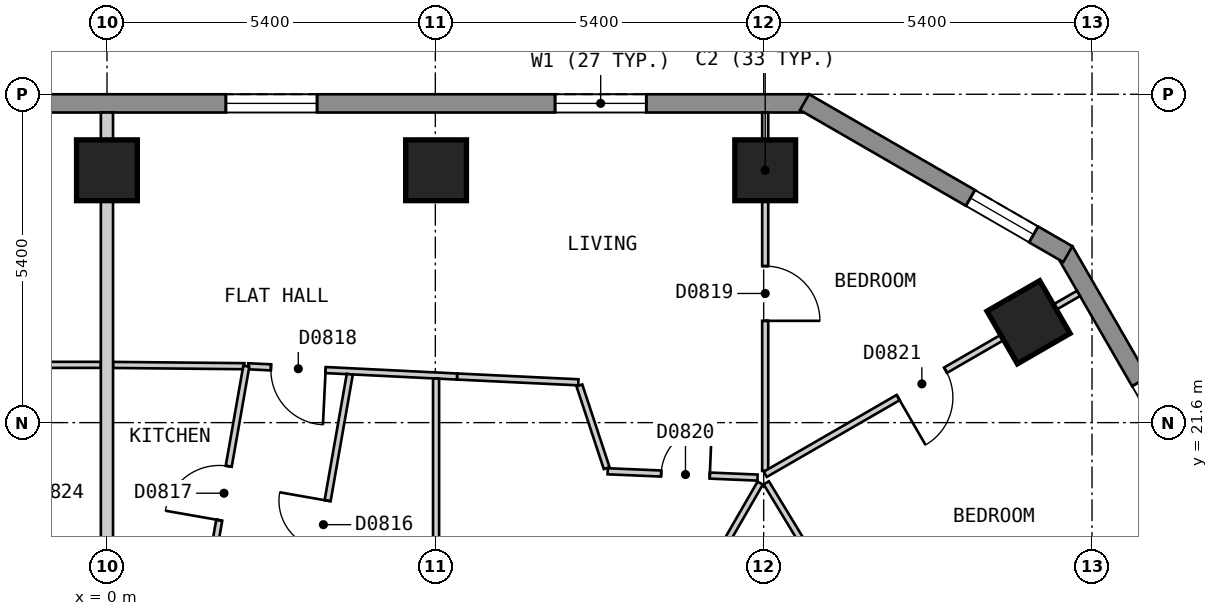
"""IFC4 building model, lengths in metres.
Left out: names, types, materials, properties, quantities, classifications, styles, units other than length and angle.
Written with IfcOpenShell. Run it as: python <this file> out.ifc"""

import sys

from ifc_helpers import new_model, si_unit, direction, frame, frame_2d, origin, origin_2d, place, context, subcontext, project, spatial, polyline, rectangle, outline, extrude, element, fill, save


model = new_model("IFC4")
c1 = context("Model", 3, precision=1e-05, world=origin(), true_north=direction((0.0, 1.0)))
c2 = subcontext(c1, "Body", "Model", "MODEL_VIEW")
j1 = project(units=[si_unit("LENGTHUNIT", "METRE"), si_unit("PLANEANGLEUNIT", "RADIAN")], contexts=[c1])
p1 = place(None, origin())
s1 = spatial("IfcSite", under=j1, at=p1, CompositionType="ELEMENT")
p2 = place(p1, origin())
s2 = spatial("IfcBuilding", under=s1, at=p2, CompositionType="ELEMENT")
p3 = place(p2, frame((0.0, 0.0, 84.0)))
s3 = spatial("IfcBuildingStorey", under=s2, at=p3, CompositionType="ELEMENT", Elevation=84.0)
for number, where, z_axis, x_axis in (
    (1, (10.825, 25.75, 0.0), (0.0, 0.0, 1.0), (-1.0, 0.0, 0.0)),
    (2, (5.412, 25.75, 0.0), (0.0, 0.0, 1.0), (-1.0, 0.0, 0.0)),
    (3, (-0.001, 25.75, 0.0), (0.0, 0.0, 1.0), (-1.0, 0.0, 0.0)),
    (4, (15.156, 23.25, 0.0), (0.0, 0.0, 1.0), (-0.5, 0.866, 0.0)),
):
    element("IfcColumn", number, at=place(p3, frame(where, z_axis=z_axis, x_axis=x_axis)), inside=s3, PredefinedType="COLUMN", context=c2, shape_type="SweptSolid", body=[
        extrude(rectangle(XDim=1.0, YDim=1.0, at=origin_2d()), origin(), (0.0, 0.0, 1.0), 3.0),
    ])
p4 = place(p3, frame((11.547, 26.85, 0.0), z_axis=(0.0, 0.0, 1.0), x_axis=(-1.0, 0.0, 0.0)))
e5 = element("IfcWall", 5, at=p4, inside=s3, PredefinedType="SOLIDWALL", context=c2, shape_type="SweptSolid", body=[
    extrude(outline(polyline([(0.0, -0.15), (23.094, -0.15), (23.014, 0.15), (0.08, 0.15), (0.0, -0.15)])), origin(), (0.0, 0.0, 1.0), 2.7),
])
p5 = place(p4, frame((2.678, 0.0, 0.15)))
e6 = element("IfcOpeningElement", 6, at=p5, cuts=e5, PredefinedType="OPENING", context=c2, shape_type="SweptSolid", body=[
    extrude(rectangle(XDim=1.5, YDim=2.1, at=frame_2d((0.75, 1.05))), frame((0.0, 0.16, 0.0), z_axis=(0.0, -1.0, 0.0), x_axis=(1.0, 0.0, 0.0)), (0.0, 0.0, 1.0), 0.32),
])
p6 = place(p4, frame((8.092, 0.0, 0.15)))
e7 = element("IfcOpeningElement", 7, at=p6, cuts=e5, PredefinedType="OPENING", context=c2, shape_type="SweptSolid", body=[
    extrude(rectangle(XDim=1.5, YDim=2.1, at=frame_2d((0.75, 1.05))), frame((0.0, 0.16, 0.0), z_axis=(0.0, -1.0, 0.0), x_axis=(1.0, 0.0, 0.0)), (0.0, 0.0, 1.0), 0.32),
])
p7 = place(p4, frame((13.504, 0.0, 0.15)))
e8 = element("IfcOpeningElement", 8, at=p7, cuts=e5, PredefinedType="OPENING", context=c2, shape_type="SweptSolid", body=[
    extrude(rectangle(XDim=1.5, YDim=2.1, at=frame_2d((0.75, 1.05))), frame((0.0, 0.16, 0.0), z_axis=(0.0, -1.0, 0.0), x_axis=(1.0, 0.0, 0.0)), (0.0, 0.0, 1.0), 0.32),
])
p8 = place(p4, frame((18.917, 0.0, 0.15)))
e9 = element("IfcOpeningElement", 9, at=p8, cuts=e5, PredefinedType="OPENING", context=c2, shape_type="SweptSolid", body=[
    extrude(rectangle(XDim=1.5, YDim=2.1, at=frame_2d((0.75, 1.05))), frame((0.0, 0.16, 0.0), z_axis=(0.0, -1.0, 0.0), x_axis=(1.0, 0.0, 0.0)), (0.0, 0.0, 1.0), 0.32),
])
p9 = place(p3, frame((29.027, 1.425, 0.0), z_axis=(0.0, 0.0, 1.0), x_axis=(-0.500027479704, 0.866009537788, 0.0)))
e10 = element("IfcWall", 10, at=p9, inside=s3, PredefinedType="SOLIDWALL", context=c2, shape_type="SweptSolid", body=[
    extrude(outline(polyline([(0.0, -0.15), (26.559, -0.15), (26.478, 0.15), (0.08, 0.15), (0.0, -0.15)])), origin(), (0.0, 0.0, 1.0), 2.7),
])
p10 = place(p9, frame((2.483, 0.0, 0.15)))
e11 = element("IfcOpeningElement", 11, at=p10, cuts=e10, PredefinedType="OPENING", context=c2, shape_type="SweptSolid", body=[
    extrude(rectangle(XDim=1.5, YDim=2.1, at=frame_2d((0.75, 1.05))), frame((0.0, 0.16, 0.0), z_axis=(0.0, -1.0, 0.0), x_axis=(1.0, 0.0, 0.0)), (0.0, 0.0, 1.0), 0.32),
])
p11 = place(p9, frame((7.506, 0.0, 0.15)))
e12 = element("IfcOpeningElement", 12, at=p11, cuts=e10, PredefinedType="OPENING", context=c2, shape_type="SweptSolid", body=[
    extrude(rectangle(XDim=1.5, YDim=2.1, at=frame_2d((0.75, 1.05))), frame((0.0, 0.16, 0.0), z_axis=(0.0, -1.0, 0.0), x_axis=(1.0, 0.0, 0.0)), (0.0, 0.0, 1.0), 0.32),
])
p12 = place(p9, frame((12.529, 0.0, 0.15)))
e13 = element("IfcOpeningElement", 13, at=p12, cuts=e10, PredefinedType="OPENING", context=c2, shape_type="SweptSolid", body=[
    extrude(rectangle(XDim=1.5, YDim=2.1, at=frame_2d((0.75, 1.05))), frame((0.0, 0.16, 0.0), z_axis=(0.0, -1.0, 0.0), x_axis=(1.0, 0.0, 0.0)), (0.0, 0.0, 1.0), 0.32),
])
p13 = place(p9, frame((17.552, 0.0, 0.15)))
e14 = element("IfcOpeningElement", 14, at=p13, cuts=e10, PredefinedType="OPENING", context=c2, shape_type="SweptSolid", body=[
    extrude(rectangle(XDim=1.5, YDim=2.1, at=frame_2d((0.75, 1.05))), frame((0.0, 0.16, 0.0), z_axis=(0.0, -1.0, 0.0), x_axis=(1.0, 0.0, 0.0)), (0.0, 0.0, 1.0), 0.32),
])
p14 = place(p9, frame((22.575, 0.0, 0.15)))
e15 = element("IfcOpeningElement", 15, at=p14, cuts=e10, PredefinedType="OPENING", context=c2, shape_type="SweptSolid", body=[
    extrude(rectangle(XDim=1.5, YDim=2.1, at=frame_2d((0.75, 1.05))), frame((0.0, 0.16, 0.0), z_axis=(0.0, -1.0, 0.0), x_axis=(1.0, 0.0, 0.0)), (0.0, 0.0, 1.0), 0.32),
])
p15 = place(p3, frame((15.802, 24.37, 0.0), z_axis=(0.0, 0.0, 1.0), x_axis=(-0.866022959057, 0.500004234368, 0.0)))
e16 = element("IfcWall", 16, at=p15, inside=s3, PredefinedType="SOLIDWALL", context=c2, shape_type="SweptSolid", body=[
    extrude(outline(polyline([(0.0, -0.15), (5.0, -0.15), (4.92, 0.15), (0.08, 0.15), (0.0, -0.15)])), origin(), (0.0, 0.0, 1.0), 2.7),
])
p16 = place(p15, frame((0.65, 0.0, 0.15)))
e17 = element("IfcOpeningElement", 17, at=p16, cuts=e16, PredefinedType="OPENING", context=c2, shape_type="SweptSolid", body=[
    extrude(rectangle(XDim=1.2, YDim=2.1, at=frame_2d((0.6, 1.05))), frame((0.0, 0.16, 0.0), z_axis=(0.0, -1.0, 0.0), x_axis=(1.0, 0.0, 0.0)), (0.0, 0.0, 1.0), 0.32),
])
p17 = place(p3, frame((0.099, 22.549, 0.0), z_axis=(0.0, 0.0, 1.0), x_axis=(0.99995279897, -0.009715957599, 0.0)))
e18 = element("IfcWall", 18, at=p17, inside=s3, PredefinedType="PARTITIONING", context=c2, shape_type="SweptSolid", body=[
    extrude(rectangle(XDim=2.161, YDim=0.1, at=frame_2d((1.081, 0.0))), origin(), (0.0, 0.0, 1.0), 2.7),
])
p18 = place(p3, frame((7.769, 22.212, 0.0), z_axis=(0.0, 0.0, 1.0), x_axis=(0.313312924695, -0.949649941409, 0.0)))
e19 = element("IfcWall", 19, at=p18, inside=s3, PredefinedType="PARTITIONING", context=c2, shape_type="SweptSolid", body=[
    extrude(rectangle(XDim=1.433, YDim=0.1, at=frame_2d((0.717, 0.0))), origin(), (0.0, 0.0, 1.0), 2.7),
])
p19 = place(p3, frame((10.843, 20.61, 0.0), z_axis=(0.0, 0.0, 1.0), x_axis=(0.518481125811, -0.855089072657, 0.0)))
e20 = element("IfcWall", 20, at=p19, inside=s3, PredefinedType="PARTITIONING", context=c2, shape_type="SweptSolid", body=[
    extrude(rectangle(XDim=4.795, YDim=0.1, at=frame_2d((2.397, 0.0))), origin(), (0.0, 0.0, 1.0), 2.7),
])
p20 = place(p19, frame((1.999, 0.0, 0.0)))
e21 = element("IfcOpeningElement", 21, at=p20, cuts=e20, PredefinedType="OPENING", context=c2, shape_type="SweptSolid", body=[
    extrude(rectangle(XDim=0.8, YDim=2.1, at=frame_2d((0.4, 1.05))), frame((0.0, 0.06, 0.0), z_axis=(0.0, -1.0, 0.0), x_axis=(1.0, 0.0, 0.0)), (0.0, 0.0, 1.0), 0.12),
])
p21 = place(p3, frame((8.235, 20.8, 0.0), z_axis=(0.0, 0.0, 1.0), x_axis=(0.999110277005, -0.042174096116, 0.0)))
e22 = element("IfcWall", 22, at=p21, inside=s3, PredefinedType="PARTITIONING", context=c2, shape_type="SweptSolid", body=[
    extrude(rectangle(XDim=2.466, YDim=0.1, at=frame_2d((1.233, 0.0))), origin(), (0.0, 0.0, 1.0), 2.7),
])
p22 = place(p21, frame((0.88, 0.0, 0.0)))
e23 = element("IfcOpeningElement", 23, at=p22, cuts=e22, PredefinedType="OPENING", context=c2, shape_type="SweptSolid", body=[
    extrude(rectangle(XDim=0.8, YDim=2.1, at=frame_2d((0.4, 1.05))), frame((0.0, 0.06, 0.0), z_axis=(0.0, -1.0, 0.0), x_axis=(1.0, 0.0, 0.0)), (0.0, 0.0, 1.0), 0.12),
])
p23 = place(p3, frame((5.757, 22.358, 0.0), z_axis=(0.0, 0.0, 1.0), x_axis=(0.998868690804, -0.047553533316, 0.0)))
e24 = element("IfcWall", 24, at=p23, inside=s3, PredefinedType="PARTITIONING", context=c2, shape_type="SweptSolid", body=[
    extrude(rectangle(XDim=1.997, YDim=0.1, at=frame_2d((0.999, 0.0))), origin(), (0.0, 0.0, 1.0), 2.7),
])
p24 = place(p3, frame((2.321, 22.527, 0.0), z_axis=(0.0, 0.0, 1.0), x_axis=(0.998789924329, -0.049180149038, 0.0)))
e25 = element("IfcWall", 25, at=p24, inside=s3, PredefinedType="PARTITIONING", context=c2, shape_type="SweptSolid", body=[
    extrude(rectangle(XDim=3.44, YDim=0.1, at=frame_2d((1.72, 0.0))), origin(), (0.0, 0.0, 1.0), 2.7),
])
p25 = place(p24, frame((0.376, 0.0, 0.0)))
e26 = element("IfcOpeningElement", 26, at=p25, cuts=e25, PredefinedType="OPENING", context=c2, shape_type="SweptSolid", body=[
    extrude(rectangle(XDim=0.9, YDim=2.1, at=frame_2d((0.45, 1.05))), frame((0.0, 0.06, 0.0), z_axis=(0.0, -1.0, 0.0), x_axis=(1.0, 0.0, 0.0)), (0.0, 0.0, 1.0), 0.12),
])
p26 = place(p3, frame((-5.384, 22.55, 0.0), z_axis=(0.0, 0.0, 1.0), x_axis=(1.0, 0.0, 0.0)))
e27 = element("IfcWall", 27, at=p26, inside=s3, PredefinedType="PARTITIONING", context=c2, shape_type="SweptSolid", body=[
    extrude(rectangle(XDim=5.283, YDim=0.1, at=frame_2d((2.642, 0.0))), origin(), (0.0, 0.0, 1.0), 2.7),
])
p27 = place(p26, frame((2.226, 0.0, 0.0)))
e28 = element("IfcOpeningElement", 28, at=p27, cuts=e27, PredefinedType="OPENING", context=c2, shape_type="SweptSolid", body=[
    extrude(rectangle(XDim=0.9, YDim=2.1, at=frame_2d((0.45, 1.05))), frame((0.0, 0.06, 0.0), z_axis=(0.0, -1.0, 0.0), x_axis=(1.0, 0.0, 0.0)), (0.0, 0.0, 1.0), 0.12),
])
p28 = place(p3, frame((8.43, 16.6, 0.0), z_axis=(0.0, 0.0, 1.0), x_axis=(0.50003312339, 0.866006279142, 0.0)))
e29 = element("IfcWall", 29, at=p28, inside=s3, PredefinedType="PARTITIONING", context=c2, shape_type="SweptSolid", body=[
    extrude(rectangle(XDim=4.626, YDim=0.1, at=frame_2d((2.313, 0.0))), origin(), (0.0, 0.0, 1.0), 2.7),
])
p29 = place(p3, frame((3.134, 17.5, 0.0), z_axis=(0.0, 0.0, 1.0), x_axis=(0.172821216702, 0.984953210593, 0.0)))
e30 = element("IfcWall", 30, at=p29, inside=s3, PredefinedType="PARTITIONING", context=c2, shape_type="SweptSolid", body=[
    extrude(rectangle(XDim=4.97, YDim=0.1, at=frame_2d((2.485, 0.0))), origin(), (0.0, 0.0, 1.0), 2.7),
])
p30 = place(p29, frame((2.059, 0.0, 0.0)))
e31 = element("IfcOpeningElement", 31, at=p30, cuts=e30, PredefinedType="OPENING", context=c2, shape_type="SweptSolid", body=[
    extrude(rectangle(XDim=0.8, YDim=2.1, at=frame_2d((0.4, 1.05))), frame((0.0, 0.06, 0.0), z_axis=(0.0, -1.0, 0.0), x_axis=(1.0, 0.0, 0.0)), (0.0, 0.0, 1.0), 0.12),
])
p31 = place(p3, frame((1.557, 18.35, 0.0), z_axis=(0.0, 0.0, 1.0), x_axis=(0.173062973099, 0.984910761106, 0.0)))
e32 = element("IfcWall", 32, at=p31, inside=s3, PredefinedType="PARTITIONING", context=c2, shape_type="SweptSolid", body=[
    extrude(rectangle(XDim=4.242, YDim=0.1, at=frame_2d((2.121, 0.0))), origin(), (0.0, 0.0, 1.0), 2.7),
])
p32 = place(p31, frame((1.671, 0.0, 0.0)))
e33 = element("IfcOpeningElement", 33, at=p32, cuts=e32, PredefinedType="OPENING", context=c2, shape_type="SweptSolid", body=[
    extrude(rectangle(XDim=0.9, YDim=2.1, at=frame_2d((0.45, 1.05))), frame((0.0, 0.06, 0.0), z_axis=(0.0, -1.0, 0.0), x_axis=(1.0, 0.0, 0.0)), (0.0, 0.0, 1.0), 0.12),
])
p33 = place(p3, frame((5.412, 17.4, 0.0), z_axis=(0.0, 0.0, 1.0), x_axis=(0.0, 1.0, 0.0)))
e34 = element("IfcWall", 34, at=p33, inside=s3, PredefinedType="PARTITIONING", context=c2, shape_type="SweptSolid", body=[
    extrude(rectangle(XDim=4.925, YDim=0.1, at=frame_2d((2.462, 0.0))), origin(), (0.0, 0.0, 1.0), 2.7),
])
p34 = place(p3, frame((10.825, 20.806, 0.0), z_axis=(0.0, 0.0, 1.0), x_axis=(0.0, 1.0, 0.0)))
e35 = element("IfcWall", 35, at=p34, inside=s3, PredefinedType="PARTITIONING", context=c2, shape_type="SweptSolid", body=[
    extrude(rectangle(XDim=5.894, YDim=0.1, at=frame_2d((2.947, 0.0))), origin(), (0.0, 0.0, 1.0), 2.7),
])
p35 = place(p34, frame((2.468, 0.0, 0.0)))
e36 = element("IfcOpeningElement", 36, at=p35, cuts=e35, PredefinedType="OPENING", context=c2, shape_type="SweptSolid", body=[
    extrude(rectangle(XDim=0.9, YDim=2.1, at=frame_2d((0.45, 1.05))), frame((0.0, 0.06, 0.0), z_axis=(0.0, -1.0, 0.0), x_axis=(1.0, 0.0, 0.0)), (0.0, 0.0, 1.0), 0.12),
])
p36 = place(p3, frame((10.826, 20.75, 0.0), z_axis=(0.0, 0.0, 1.0), x_axis=(0.865986712877, 0.50006700863, 0.0)))
e37 = element("IfcWall", 37, at=p36, inside=s3, PredefinedType="PARTITIONING", context=c2, shape_type="SweptSolid", body=[
    extrude(rectangle(XDim=5.949, YDim=0.1, at=frame_2d((2.975, 0.0))), origin(), (0.0, 0.0, 1.0), 2.7),
])
p37 = place(p36, frame((2.524, 0.0, 0.0)))
e38 = element("IfcOpeningElement", 38, at=p37, cuts=e37, PredefinedType="OPENING", context=c2, shape_type="SweptSolid", body=[
    extrude(rectangle(XDim=0.9, YDim=2.1, at=frame_2d((0.45, 1.05))), frame((0.0, 0.06, 0.0), z_axis=(0.0, -1.0, 0.0), x_axis=(1.0, 0.0, 0.0)), (0.0, 0.0, 1.0), 0.12),
])
p38 = place(p3, frame((-0.001, 18.45, 0.0), z_axis=(0.0, 0.0, 1.0), x_axis=(0.0, 1.0, 0.0)))
e39 = element("IfcWall", 39, at=p38, inside=s3, PredefinedType="PARTITIONING", context=c2, shape_type="SweptSolid", body=[
    extrude(rectangle(XDim=8.25, YDim=0.2, at=frame_2d((4.125, 0.0))), origin(), (0.0, 0.0, 1.0), 2.7),
])
p39 = place(p5, origin())
e40 = element("IfcWindow", 40, at=p39, inside=s3, PartitioningType="SINGLE_PANEL", PredefinedType="WINDOW", context=c2, shape_type="SweptSolid", body=[
    extrude(rectangle(XDim=1.5, YDim=2.1, at=frame_2d((0.75, 1.05))), frame((0.0, 0.03, 0.0), z_axis=(0.0, -1.0, 0.0), x_axis=(1.0, 0.0, 0.0)), (0.0, 0.0, 1.0), 0.06),
])
fill(e6, e40)
p40 = place(p6, origin())
e41 = element("IfcWindow", 41, at=p40, inside=s3, PartitioningType="SINGLE_PANEL", PredefinedType="WINDOW", context=c2, shape_type="SweptSolid", body=[
    extrude(rectangle(XDim=1.5, YDim=2.1, at=frame_2d((0.75, 1.05))), frame((0.0, 0.03, 0.0), z_axis=(0.0, -1.0, 0.0), x_axis=(1.0, 0.0, 0.0)), (0.0, 0.0, 1.0), 0.06),
])
fill(e7, e41)
p41 = place(p16, origin())
e42 = element("IfcWindow", 42, at=p41, inside=s3, PartitioningType="SINGLE_PANEL", PredefinedType="WINDOW", context=c2, shape_type="SweptSolid", body=[
    extrude(rectangle(XDim=1.2, YDim=2.1, at=frame_2d((0.6, 1.05))), frame((0.0, 0.03, 0.0), z_axis=(0.0, -1.0, 0.0), x_axis=(1.0, 0.0, 0.0)), (0.0, 0.0, 1.0), 0.06),
])
fill(e17, e42)
p42 = place(p30, origin())
e43 = element("IfcDoor", 43, at=p42, inside=s3, OperationType="SINGLE_SWING_RIGHT", PredefinedType="DOOR", context=c2, shape_type="SweptSolid", body=[
    extrude(rectangle(XDim=0.8, YDim=2.1, at=frame_2d((0.4, 1.05))), frame((0.0, 0.025, 0.0), z_axis=(0.0, -1.0, 0.0), x_axis=(1.0, 0.0, 0.0)), (0.0, 0.0, 1.0), 0.05),
])
fill(e31, e43)
p43 = place(p32, origin())
e44 = element("IfcDoor", 44, at=p43, inside=s3, OperationType="SINGLE_SWING_LEFT", PredefinedType="DOOR", context=c2, shape_type="SweptSolid", body=[
    extrude(rectangle(XDim=0.9, YDim=2.1, at=frame_2d((0.45, 1.05))), frame((0.0, 0.025, 0.0), z_axis=(0.0, -1.0, 0.0), x_axis=(1.0, 0.0, 0.0)), (0.0, 0.0, 1.0), 0.05),
])
fill(e33, e44)
p44 = place(p25, origin())
e45 = element("IfcDoor", 45, at=p44, inside=s3, OperationType="SINGLE_SWING_RIGHT", PredefinedType="DOOR", context=c2, shape_type="SweptSolid", body=[
    extrude(rectangle(XDim=0.9, YDim=2.1, at=frame_2d((0.45, 1.05))), frame((0.0, 0.025, 0.0), z_axis=(0.0, -1.0, 0.0), x_axis=(1.0, 0.0, 0.0)), (0.0, 0.0, 1.0), 0.05),
])
fill(e26, e45)
p45 = place(p35, origin())
e46 = element("IfcDoor", 46, at=p45, inside=s3, OperationType="SINGLE_SWING_LEFT", PredefinedType="DOOR", context=c2, shape_type="SweptSolid", body=[
    extrude(rectangle(XDim=0.9, YDim=2.1, at=frame_2d((0.45, 1.05))), frame((0.0, 0.025, 0.0), z_axis=(0.0, -1.0, 0.0), x_axis=(1.0, 0.0, 0.0)), (0.0, 0.0, 1.0), 0.05),
])
fill(e36, e46)
p46 = place(p22, origin())
e47 = element("IfcDoor", 47, at=p46, inside=s3, OperationType="SINGLE_SWING_RIGHT", PredefinedType="DOOR", context=c2, shape_type="SweptSolid", body=[
    extrude(rectangle(XDim=0.8, YDim=2.1, at=frame_2d((0.4, 1.05))), frame((0.0, 0.025, 0.0), z_axis=(0.0, -1.0, 0.0), x_axis=(1.0, 0.0, 0.0)), (0.0, 0.0, 1.0), 0.05),
])
fill(e23, e47)
p47 = place(p37, origin())
e48 = element("IfcDoor", 48, at=p47, inside=s3, OperationType="SINGLE_SWING_LEFT", PredefinedType="DOOR", context=c2, shape_type="SweptSolid", body=[
    extrude(rectangle(XDim=0.9, YDim=2.1, at=frame_2d((0.45, 1.05))), frame((0.0, 0.025, 0.0), z_axis=(0.0, -1.0, 0.0), x_axis=(1.0, 0.0, 0.0)), (0.0, 0.0, 1.0), 0.05),
])
fill(e38, e48)
save(model, sys.argv[1])
